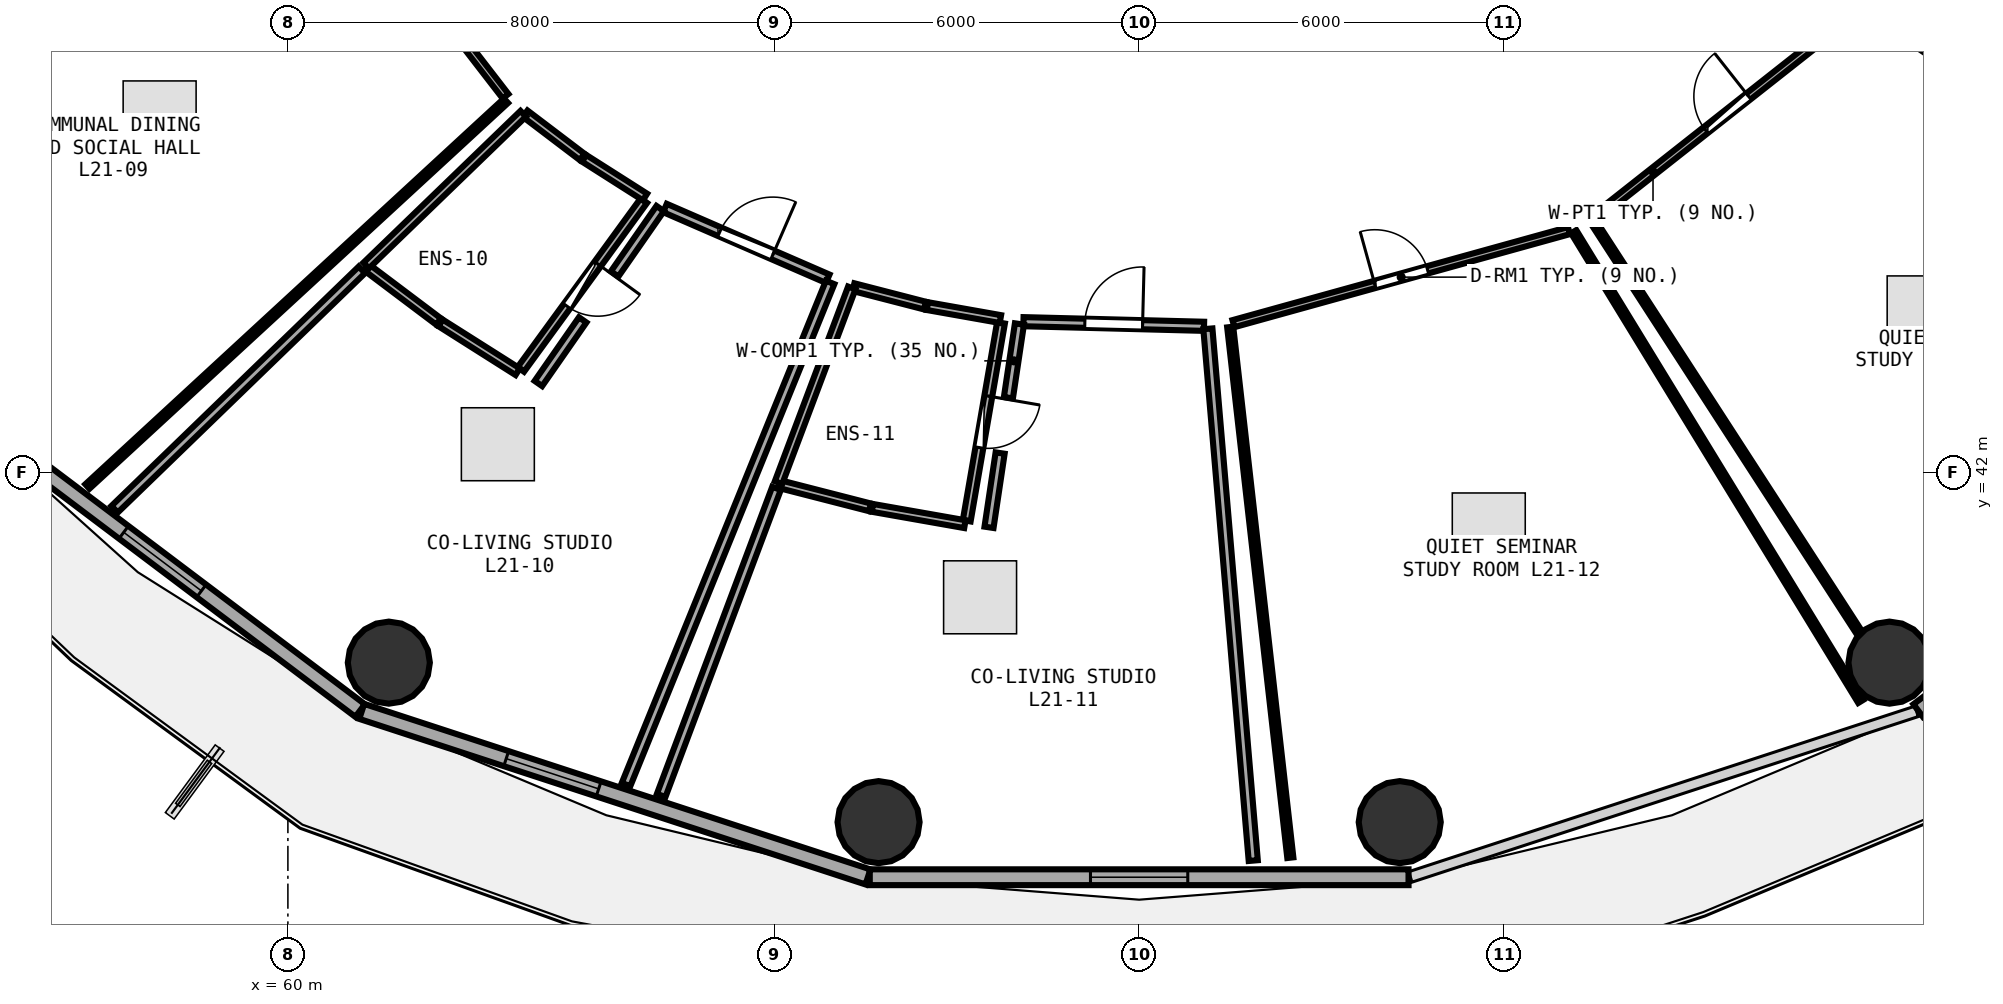
"""IFC4 building model, lengths in metres.
Left out: names, types, materials, properties, quantities, classifications, styles, units other than length and angle.
Written with IfcOpenShell. Run it as: python <this file> out.ifc"""

import sys

from ifc_helpers import new_model, si_unit, direction, frame, frame_2d, origin, origin_2d, place, context, subcontext, project, spatial, rectangle, circle, extrude, element, fill, save


model = new_model("IFC4")
c1 = context("Model", 3, precision=1e-05, world=origin(), true_north=direction((0.0, 1.0)))
c2 = subcontext(c1, "Body", "Model", "MODEL_VIEW")
j1 = project(units=[si_unit("LENGTHUNIT", "METRE"), si_unit("PLANEANGLEUNIT", "RADIAN")], contexts=[c1])
p1 = place(None, origin())
s1 = spatial("IfcSite", under=j1, at=p1, CompositionType="ELEMENT")
p2 = place(p1, origin())
s2 = spatial("IfcBuilding", under=s1, at=p2, CompositionType="ELEMENT")
p3 = place(p2, frame((0.0, 0.0, 83.85)))
s3 = spatial("IfcBuildingStorey", under=s2, at=p3, CompositionType="ELEMENT", Elevation=83.85)
for number, where, z_axis, x_axis in (
    (1, (61.66, 38.878, 0.0), (0.0, 0.0, 1.0), (1.0, 0.0, 0.0)),
    (2, (69.714, 36.255, 0.0), (0.0, 0.0, 1.0), (1.0, 0.0, 0.0)),
    (3, (78.286, 36.255, 0.0), (0.0, 0.0, 1.0), (1.0, 0.0, 0.0)),
    (4, (86.34, 38.878, 0.0), (0.0, 0.0, 1.0), (1.0, 0.0, 0.0)),
):
    element("IfcColumn", number, at=place(p3, frame(where, z_axis=z_axis, x_axis=x_axis)), inside=s3, PredefinedType="COLUMN", context=c2, shape_type="SweptSolid", body=[
        extrude(circle(Radius=0.675, at=origin_2d()), origin(), (0.0, 0.0, 1.0), 3.75),
    ])
p4 = place(p3, frame((54.401, 43.207, 0.0), z_axis=(0.0, 0.0, 1.0), x_axis=(0.798501507879, -0.601992808857, 0.0)))
e5 = element("IfcWall", 5, at=p4, inside=s3, PredefinedType="SOLIDWALL", context=c2, shape_type="SweptSolid", body=[
    extrude(rectangle(XDim=8.499, YDim=0.26, at=frame_2d((4.25, 0.0))), origin(), (0.0, 0.0, 1.0), 3.475),
])
p5 = place(p4, frame((3.63, 0.0, 0.85)))
e6 = element("IfcOpeningElement", 6, at=p5, cuts=e5, PredefinedType="OPENING", context=c2, shape_type="SweptSolid", body=[
    extrude(rectangle(XDim=1.6, YDim=1.45, at=frame_2d((0.8, 0.725))), frame((0.0, 0.14, 0.0), z_axis=(0.0, -1.0, 0.0), x_axis=(1.0, 0.0, 0.0)), (0.0, 0.0, 1.0), 0.28),
])
p6 = place(p3, frame((61.214, 38.077, 0.0), z_axis=(0.0, 0.0, 1.0), x_axis=(0.950471101963, -0.310812941064, 0.0)))
e7 = element("IfcWall", 7, at=p6, inside=s3, PredefinedType="SOLIDWALL", context=c2, shape_type="SweptSolid", body=[
    extrude(rectangle(XDim=8.76, YDim=0.26, at=frame_2d((4.38, 0.0))), origin(), (0.0, 0.0, 1.0), 3.475),
])
p7 = place(p6, frame((2.5, 0.0, 0.85)))
e8 = element("IfcOpeningElement", 8, at=p7, cuts=e7, PredefinedType="OPENING", context=c2, shape_type="SweptSolid", body=[
    extrude(rectangle(XDim=1.6, YDim=1.45, at=frame_2d((0.8, 0.725))), frame((0.0, 0.14, 0.0), z_axis=(0.0, -1.0, 0.0), x_axis=(1.0, 0.0, 0.0)), (0.0, 0.0, 1.0), 0.28),
])
p8 = place(p3, frame((69.57, 35.349, 0.0), z_axis=(0.0, 0.0, 1.0), x_axis=(1.0, 0.0, 0.0)))
e9 = element("IfcWall", 9, at=p8, inside=s3, PredefinedType="SOLIDWALL", context=c2, shape_type="SweptSolid", body=[
    extrude(rectangle(XDim=8.861, YDim=0.26, at=frame_2d((4.43, 0.0))), origin(), (0.0, 0.0, 1.0), 3.475),
])
p9 = place(p8, frame((3.63, 0.0, 0.85)))
e10 = element("IfcOpeningElement", 10, at=p9, cuts=e9, PredefinedType="OPENING", context=c2, shape_type="SweptSolid", body=[
    extrude(rectangle(XDim=1.6, YDim=1.45, at=frame_2d((0.8, 0.725))), frame((0.0, 0.14, 0.0), z_axis=(0.0, -1.0, 0.0), x_axis=(1.0, 0.0, 0.0)), (0.0, 0.0, 1.0), 0.28),
])
p10 = place(p3, frame((86.812, 38.09, 0.0), z_axis=(0.0, 0.0, 1.0), x_axis=(0.798501507879, 0.601992808857, 0.0)))
e11 = element("IfcWall", 11, at=p10, inside=s3, PredefinedType="SOLIDWALL", context=c2, shape_type="SweptSolid", body=[
    extrude(rectangle(XDim=8.499, YDim=0.26, at=frame_2d((4.25, 0.0))), origin(), (0.0, 0.0, 1.0), 3.475),
])
p11 = place(p10, frame((3.45, 0.0, 0.85)))
e12 = element("IfcOpeningElement", 12, at=p11, cuts=e11, PredefinedType="OPENING", context=c2, shape_type="SweptSolid", body=[
    extrude(rectangle(XDim=1.6, YDim=1.45, at=frame_2d((0.8, 0.725))), frame((0.0, 0.14, 0.0), z_axis=(0.0, -1.0, 0.0), x_axis=(1.0, 0.0, 0.0)), (0.0, 0.0, 1.0), 0.28),
])
p12 = place(p3, frame((60.275, 52.473, 0.0), z_axis=(0.0, 0.0, 1.0), x_axis=(0.611167326409, -0.791501420801, 0.0)))
e13 = element("IfcWall", 13, at=p12, inside=s3, PredefinedType="PARTITIONING", context=c2, shape_type="SweptSolid", body=[
    extrude(rectangle(XDim=5.407, YDim=0.12, at=frame_2d((2.704, 0.0))), origin(), (0.0, 0.0, 1.0), 2.925),
])
p13 = place(p12, frame((2.254, 0.0, 0.0)))
e14 = element("IfcOpeningElement", 14, at=p13, cuts=e13, PredefinedType="OPENING", context=c2, shape_type="SweptSolid", body=[
    extrude(rectangle(XDim=0.9, YDim=2.08, at=frame_2d((0.45, 1.04))), frame((0.0, 0.07, 0.0), z_axis=(0.0, -1.0, 0.0), x_axis=(1.0, 0.0, 0.0)), (0.0, 0.0, 1.0), 0.14),
])
p14 = place(p3, frame((65.855, 46.477, 0.0), z_axis=(0.0, 0.0, 1.0), x_axis=(-0.589016516568, -0.808120995402, 0.0)))
e15 = element("IfcWall", 15, at=p14, inside=s3, PredefinedType="PLUMBINGWALL", context=c2, shape_type="SweptSolid", body=[
    extrude(rectangle(XDim=3.435, YDim=0.13, at=frame_2d((1.718, 0.0))), origin(), (0.0, 0.0, 1.0), 3.175),
])
p15 = place(p14, frame((1.288, 0.0, 0.0)))
e16 = element("IfcOpeningElement", 16, at=p15, cuts=e15, PredefinedType="OPENING", context=c2, shape_type="SweptSolid", body=[
    extrude(rectangle(XDim=0.86, YDim=2.05, at=frame_2d((0.43, 1.025))), frame((0.0, 0.075, 0.0), z_axis=(0.0, -1.0, 0.0), x_axis=(1.0, 0.0, 0.0)), (0.0, 0.0, 1.0), 0.15),
])
p16 = place(p3, frame((66.201, 46.355, 0.0), z_axis=(0.0, 0.0, 1.0), x_axis=(0.917173751057, -0.398487528503, 0.0)))
e17 = element("IfcWall", 17, at=p16, inside=s3, PredefinedType="PARTITIONING", context=c2, shape_type="SweptSolid", body=[
    extrude(rectangle(XDim=2.919, YDim=0.15, at=frame_2d((1.459, 0.0))), origin(), (0.0, 0.0, 1.0), 2.925),
])
p17 = place(p16, frame((0.984, 0.0, 0.0)))
e18 = element("IfcOpeningElement", 18, at=p17, cuts=e17, PredefinedType="OPENING", context=c2, shape_type="SweptSolid", body=[
    extrude(rectangle(XDim=0.95, YDim=2.08, at=frame_2d((0.475, 1.04))), frame((0.0, 0.085, 0.0), z_axis=(0.0, -1.0, 0.0), x_axis=(1.0, 0.0, 0.0)), (0.0, 0.0, 1.0), 0.17),
])
p18 = place(p3, frame((71.728, 44.466, 0.0), z_axis=(0.0, 0.0, 1.0), x_axis=(-0.170592496202, -0.985341666753, 0.0)))
e19 = element("IfcWall", 19, at=p18, inside=s3, PredefinedType="PLUMBINGWALL", context=c2, shape_type="SweptSolid", body=[
    extrude(rectangle(XDim=3.303, YDim=0.13, at=frame_2d((1.651, 0.0))), origin(), (0.0, 0.0, 1.0), 3.175),
])
p19 = place(p18, frame((1.222, 0.0, 0.0)))
e20 = element("IfcOpeningElement", 20, at=p19, cuts=e19, PredefinedType="OPENING", context=c2, shape_type="SweptSolid", body=[
    extrude(rectangle(XDim=0.86, YDim=2.05, at=frame_2d((0.43, 1.025))), frame((0.0, 0.075, 0.0), z_axis=(0.0, -1.0, 0.0), x_axis=(1.0, 0.0, 0.0)), (0.0, 0.0, 1.0), 0.15),
])
p20 = place(p3, frame((72.097, 44.486, 0.0), z_axis=(0.0, 0.0, 1.0), x_axis=(0.999671268913, -0.025638917871, 0.0)))
e21 = element("IfcWall", 21, at=p20, inside=s3, PredefinedType="PARTITIONING", context=c2, shape_type="SweptSolid", body=[
    extrude(rectangle(XDim=2.971, YDim=0.15, at=frame_2d((1.485, 0.0))), origin(), (0.0, 0.0, 1.0), 3.48),
])
p21 = place(p20, frame((1.01, 0.0, 0.0)))
e22 = element("IfcOpeningElement", 22, at=p21, cuts=e21, PredefinedType="OPENING", context=c2, shape_type="SweptSolid", body=[
    extrude(rectangle(XDim=0.95, YDim=2.08, at=frame_2d((0.475, 1.04))), frame((0.0, 0.085, 0.0), z_axis=(0.0, -1.0, 0.0), x_axis=(1.0, 0.0, 0.0)), (0.0, 0.0, 1.0), 0.17),
])
p22 = place(p3, frame((75.551, 44.453, 0.0), z_axis=(0.0, 0.0, 1.0), x_axis=(0.963633279283, 0.267228185374, 0.0)))
e23 = element("IfcWall", 23, at=p22, inside=s3, PredefinedType="PARTITIONING", context=c2, shape_type="SweptSolid", body=[
    extrude(rectangle(XDim=5.726, YDim=0.12, at=frame_2d((2.863, 0.0))), origin(), (0.0, 0.0, 1.0), 2.925),
])
p23 = place(p22, frame((2.413, 0.0, 0.0)))
e24 = element("IfcOpeningElement", 24, at=p23, cuts=e23, PredefinedType="OPENING", context=c2, shape_type="SweptSolid", body=[
    extrude(rectangle(XDim=0.9, YDim=2.08, at=frame_2d((0.45, 1.04))), frame((0.0, 0.07, 0.0), z_axis=(0.0, -1.0, 0.0), x_axis=(1.0, 0.0, 0.0)), (0.0, 0.0, 1.0), 0.14),
])
p24 = place(p3, frame((81.494, 46.198, 0.0), z_axis=(0.0, 0.0, 1.0), x_axis=(0.785315722545, 0.619095482074, 0.0)))
e25 = element("IfcWall", 25, at=p24, inside=s3, PredefinedType="PARTITIONING", context=c2, shape_type="SweptSolid", body=[
    extrude(rectangle(XDim=5.54, YDim=0.12, at=frame_2d((2.77, 0.0))), origin(), (0.0, 0.0, 1.0), 2.925),
])
p25 = place(p24, frame((2.32, 0.0, 0.0)))
e26 = element("IfcOpeningElement", 26, at=p25, cuts=e25, PredefinedType="OPENING", context=c2, shape_type="SweptSolid", body=[
    extrude(rectangle(XDim=0.9, YDim=2.08, at=frame_2d((0.45, 1.04))), frame((0.0, 0.07, 0.0), z_axis=(0.0, -1.0, 0.0), x_axis=(1.0, 0.0, 0.0)), (0.0, 0.0, 1.0), 0.14),
])
p26 = place(p3, frame((63.587, 48.119, 0.0), z_axis=(0.0, 0.0, 1.0), x_axis=(-0.735387084409, -0.677647279995, 0.0)))
e27 = element("IfcWall", 27, at=p26, inside=s3, PredefinedType="PARTITIONING", context=c2, shape_type="SweptSolid", body=[
    extrude(rectangle(XDim=9.361, YDim=0.1, at=frame_2d((4.681, 0.0))), origin(), (0.0, 0.0, 1.0), 2.975),
])
p27 = place(p3, frame((63.901, 47.907, 0.0), z_axis=(0.0, 0.0, 1.0), x_axis=(0.796629313308, -0.604468144056, 0.0)))
e28 = element("IfcWall", 28, at=p27, inside=s3, PredefinedType="PLUMBINGWALL", context=c2, shape_type="SweptSolid", body=[
    extrude(rectangle(XDim=1.178, YDim=0.13, at=frame_2d((0.589, 0.0))), origin(), (0.0, 0.0, 1.0), 2.925),
])
p28 = place(p3, frame((64.872, 47.172, 0.0), z_axis=(0.0, 0.0, 1.0), x_axis=(0.843822426876, -0.536622504095, 0.0)))
e29 = element("IfcWall", 29, at=p28, inside=s3, PredefinedType="PLUMBINGWALL", context=c2, shape_type="SweptSolid", body=[
    extrude(rectangle(XDim=1.187, YDim=0.13, at=frame_2d((0.593, 0.0))), origin(), (0.0, 0.0, 1.0), 3.48),
])
p29 = place(p3, frame((63.779, 43.663, 0.0), z_axis=(0.0, 0.0, 1.0), x_axis=(-0.844931806669, 0.53487404319, 0.0)))
e30 = element("IfcWall", 30, at=p29, inside=s3, PredefinedType="PLUMBINGWALL", context=c2, shape_type="SweptSolid", body=[
    extrude(rectangle(XDim=1.501, YDim=0.13, at=frame_2d((0.75, 0.0))), origin(), (0.0, 0.0, 1.0), 2.925),
])
p30 = place(p3, frame((62.478, 44.488, 0.0), z_axis=(0.0, 0.0, 1.0), x_axis=(-0.798935684124, 0.601416471868, 0.0)))
e31 = element("IfcWall", 31, at=p30, inside=s3, PredefinedType="PLUMBINGWALL", context=c2, shape_type="SweptSolid", body=[
    extrude(rectangle(XDim=1.488, YDim=0.13, at=frame_2d((0.744, 0.0))), origin(), (0.0, 0.0, 1.0), 3.175),
])
p31 = place(p3, frame((61.287, 45.409, 0.0), z_axis=(0.0, 0.0, 1.0), x_axis=(0.719134400332, 0.694871005481, 0.0)))
e32 = element("IfcWall", 32, at=p31, inside=s3, PredefinedType="PLUMBINGWALL", context=c2, shape_type="SweptSolid", body=[
    extrude(rectangle(XDim=3.592, YDim=0.13, at=frame_2d((1.796, 0.0))), origin(), (0.0, 0.0, 1.0), 3.175),
])
p32 = place(p3, frame((68.918, 45.131, 0.0), z_axis=(0.0, 0.0, 1.0), x_axis=(-0.376588613193, -0.926380600193, 0.0)))
e33 = element("IfcWall", 33, at=p32, inside=s3, PredefinedType="PARTITIONING", context=c2, shape_type="SweptSolid", body=[
    extrude(rectangle(XDim=8.914, YDim=0.15, at=frame_2d((4.457, 0.0))), origin(), (0.0, 0.0, 1.0), 2.925),
])
p33 = place(p3, frame((57.15, 41.401, 0.0), z_axis=(0.0, 0.0, 1.0), x_axis=(0.718527749954, 0.695498290829, 0.0)))
e34 = element("IfcWall", 34, at=p33, inside=s3, PredefinedType="PARTITIONING", context=c2, shape_type="SweptSolid", body=[
    extrude(rectangle(XDim=5.661, YDim=0.15, at=frame_2d((2.831, 0.0))), origin(), (0.0, 0.0, 1.0), 2.975),
])
p34 = place(p3, frame((64.12, 43.469, 0.0), z_axis=(0.0, 0.0, 1.0), x_axis=(0.571339432424, 0.820713867897, 0.0)))
e35 = element("IfcWall", 35, at=p34, inside=s3, PredefinedType="PARTITIONING", context=c2, shape_type="SweptSolid", body=[
    extrude(rectangle(XDim=1.275, YDim=0.15, at=frame_2d((0.637, 0.0))), origin(), (0.0, 0.0, 1.0), 3.175),
])
p35 = place(p3, frame((65.374, 45.27, 0.0), z_axis=(0.0, 0.0, 1.0), x_axis=(0.57134818524, 0.82070777456, 0.0)))
e36 = element("IfcWall", 36, at=p35, inside=s3, PredefinedType="PARTITIONING", context=c2, shape_type="SweptSolid", body=[
    extrude(rectangle(XDim=1.311, YDim=0.15, at=frame_2d((0.656, 0.0))), origin(), (0.0, 0.0, 1.0), 3.235),
])
p36 = place(p3, frame((69.3, 45.054, 0.0), z_axis=(0.0, 0.0, 1.0), x_axis=(0.968247539973, -0.249993402585, 0.0)))
e37 = element("IfcWall", 37, at=p36, inside=s3, PredefinedType="PLUMBINGWALL", context=c2, shape_type="SweptSolid", body=[
    extrude(rectangle(XDim=1.216, YDim=0.13, at=frame_2d((0.608, 0.0))), origin(), (0.0, 0.0, 1.0), 3.48),
])
p37 = place(p3, frame((70.517, 44.741, 0.0), z_axis=(0.0, 0.0, 1.0), x_axis=(0.98466652622, -0.174447218786, 0.0)))
e38 = element("IfcWall", 38, at=p37, inside=s3, PredefinedType="PLUMBINGWALL", context=c2, shape_type="SweptSolid", body=[
    extrude(rectangle(XDim=1.22, YDim=0.13, at=frame_2d((0.61, 0.0))), origin(), (0.0, 0.0, 1.0), 3.48),
])
p38 = place(p3, frame((71.134, 41.156, 0.0), z_axis=(0.0, 0.0, 1.0), x_axis=(-0.984831248295, 0.173514876545, 0.0)))
e39 = element("IfcWall", 39, at=p38, inside=s3, PredefinedType="PLUMBINGWALL", context=c2, shape_type="SweptSolid", body=[
    extrude(rectangle(XDim=1.545, YDim=0.13, at=frame_2d((0.772, 0.0))), origin(), (0.0, 0.0, 1.0), 3.48),
])
p39 = place(p3, frame((69.573, 41.432, 0.0), z_axis=(0.0, 0.0, 1.0), x_axis=(-0.968594416315, 0.248646046989, 0.0)))
e40 = element("IfcWall", 40, at=p39, inside=s3, PredefinedType="PLUMBINGWALL", context=c2, shape_type="SweptSolid", body=[
    extrude(rectangle(XDim=1.541, YDim=0.13, at=frame_2d((0.77, 0.0))), origin(), (0.0, 0.0, 1.0), 2.925),
])
p40 = place(p3, frame((68.069, 41.839, 0.0), z_axis=(0.0, 0.0, 1.0), x_axis=(0.352202531552, 0.935923809275, 0.0)))
e41 = element("IfcWall", 41, at=p40, inside=s3, PredefinedType="PLUMBINGWALL", context=c2, shape_type="SweptSolid", body=[
    extrude(rectangle(XDim=3.421, YDim=0.13, at=frame_2d((1.71, 0.0))), origin(), (0.0, 0.0, 1.0), 2.925),
])
p41 = place(p3, frame((75.13, 44.368, 0.0), z_axis=(0.0, 0.0, 1.0), x_axis=(0.085031915446, -0.996378228062, 0.0)))
e42 = element("IfcWall", 42, at=p41, inside=s3, PredefinedType="PARTITIONING", context=c2, shape_type="SweptSolid", body=[
    extrude(rectangle(XDim=8.777, YDim=0.15, at=frame_2d((4.389, 0.0))), origin(), (0.0, 0.0, 1.0), 2.975),
])
p42 = place(p3, frame((66.139, 36.694, 0.0), z_axis=(0.0, 0.0, 1.0), x_axis=(0.351589591196, 0.936154239088, 0.0)))
e43 = element("IfcWall", 43, at=p42, inside=s3, PredefinedType="PARTITIONING", context=c2, shape_type="SweptSolid", body=[
    extrude(rectangle(XDim=5.395, YDim=0.15, at=frame_2d((2.697, 0.0))), origin(), (0.0, 0.0, 1.0), 2.975),
])
p43 = place(p3, frame((71.531, 41.104, 0.0), z_axis=(0.0, 0.0, 1.0), x_axis=(0.147866770411, 0.989007289259, 0.0)))
e44 = element("IfcWall", 44, at=p43, inside=s3, PredefinedType="PARTITIONING", context=c2, shape_type="SweptSolid", body=[
    extrude(rectangle(XDim=1.235, YDim=0.15, at=frame_2d((0.618, 0.0))), origin(), (0.0, 0.0, 1.0), 3.175),
])
p44 = place(p3, frame((71.85, 43.235, 0.0), z_axis=(0.0, 0.0, 1.0), x_axis=(0.14797037904, 0.988991793154, 0.0)))
e45 = element("IfcWall", 45, at=p44, inside=s3, PredefinedType="PARTITIONING", context=c2, shape_type="SweptSolid", body=[
    extrude(rectangle(XDim=1.226, YDim=0.15, at=frame_2d((0.613, 0.0))), origin(), (0.0, 0.0, 1.0), 3.48),
])
p45 = place(p3, frame((81.147, 45.965, 0.0), z_axis=(0.0, 0.0, 1.0), x_axis=(0.521624536189, -0.853175153908, 0.0)))
e46 = element("IfcWall", 46, at=p45, inside=s3, PredefinedType="PARTITIONING", context=c2, shape_type="SweptSolid", body=[
    extrude(rectangle(XDim=9.053, YDim=0.1, at=frame_2d((4.526, 0.0))), origin(), (0.0, 0.0, 1.0), 2.975),
])
p46 = place(p3, frame((76.487, 35.671, 0.0), z_axis=(0.0, 0.0, 1.0), x_axis=(-0.112612784854, 0.993638948858, 0.0)))
e47 = element("IfcWall", 47, at=p46, inside=s3, PredefinedType="PARTITIONING", context=c2, shape_type="SweptSolid", body=[
    extrude(rectangle(XDim=8.782, YDim=0.1, at=frame_2d((4.391, 0.0))), origin(), (0.0, 0.0, 1.0), 2.975),
])
p47 = place(p3, frame((85.925, 49.643, 0.0), z_axis=(0.0, 0.0, 1.0), x_axis=(0.826688408753, -0.562659999319, 0.0)))
e48 = element("IfcWall", 48, at=p47, inside=s3, PredefinedType="PARTITIONING", context=c2, shape_type="SweptSolid", body=[
    extrude(rectangle(XDim=9.539, YDim=0.1, at=frame_2d((4.77, 0.0))), origin(), (0.0, 0.0, 1.0), 2.975),
])
p48 = place(p3, frame((85.844, 39.372, 0.0), z_axis=(0.0, 0.0, 1.0), x_axis=(-0.543590830013, 0.839350349691, 0.0)))
e49 = element("IfcWall", 49, at=p48, inside=s3, PredefinedType="PARTITIONING", context=c2, shape_type="SweptSolid", body=[
    extrude(rectangle(XDim=8.048, YDim=0.1, at=frame_2d((4.024, 0.0))), origin(), (0.0, 0.0, 1.0), 3.175),
])
p49 = place(p3, frame((87.552, 48.874, 0.0), z_axis=(0.0, 0.0, 1.0), x_axis=(-0.805902241708, 0.592048627065, 0.0)))
e50 = element("IfcWall", 50, at=p49, inside=s3, PredefinedType="PARTITIONING", context=c2, shape_type="SweptSolid", body=[
    extrude(rectangle(XDim=1.746, YDim=0.1, at=frame_2d((0.873, 0.0))), origin(), (0.0, 0.0, 1.0), 3.235),
])
p50 = place(p5, origin())
e51 = element("IfcWindow", 51, at=p50, inside=s3, PartitioningType="SINGLE_PANEL", PredefinedType="WINDOW", context=c2, shape_type="SweptSolid", body=[
    extrude(rectangle(XDim=1.6, YDim=1.45, at=frame_2d((0.8, 0.725))), frame((0.0, 0.03, 0.0), z_axis=(0.0, -1.0, 0.0), x_axis=(1.0, 0.0, 0.0)), (0.0, 0.0, 1.0), 0.06),
])
fill(e6, e51)
p51 = place(p7, origin())
e52 = element("IfcWindow", 52, at=p51, inside=s3, PartitioningType="SINGLE_PANEL", PredefinedType="WINDOW", context=c2, shape_type="SweptSolid", body=[
    extrude(rectangle(XDim=1.6, YDim=1.45, at=frame_2d((0.8, 0.725))), frame((0.0, 0.03, 0.0), z_axis=(0.0, -1.0, 0.0), x_axis=(1.0, 0.0, 0.0)), (0.0, 0.0, 1.0), 0.06),
])
fill(e8, e52)
p52 = place(p9, origin())
e53 = element("IfcWindow", 53, at=p52, inside=s3, PartitioningType="SINGLE_PANEL", PredefinedType="WINDOW", context=c2, shape_type="SweptSolid", body=[
    extrude(rectangle(XDim=1.6, YDim=1.45, at=frame_2d((0.8, 0.725))), frame((0.0, 0.03, 0.0), z_axis=(0.0, -1.0, 0.0), x_axis=(1.0, 0.0, 0.0)), (0.0, 0.0, 1.0), 0.06),
])
fill(e10, e53)
p53 = place(p15, origin())
e54 = element("IfcDoor", 54, at=p53, inside=s3, OperationType="SINGLE_SWING_LEFT", PredefinedType="DOOR", context=c2, shape_type="SweptSolid", body=[
    extrude(rectangle(XDim=0.86, YDim=2.05, at=frame_2d((0.43, 1.025))), frame((0.0, 0.025, 0.0), z_axis=(0.0, -1.0, 0.0), x_axis=(1.0, 0.0, 0.0)), (0.0, 0.0, 1.0), 0.05),
])
fill(e16, e54)
p54 = place(p17, origin())
e55 = element("IfcDoor", 55, at=p54, inside=s3, OperationType="SINGLE_SWING_RIGHT", PredefinedType="DOOR", context=c2, shape_type="SweptSolid", body=[
    extrude(rectangle(XDim=0.95, YDim=2.08, at=frame_2d((0.475, 1.04))), frame((0.0, 0.025, 0.0), z_axis=(0.0, -1.0, 0.0), x_axis=(1.0, 0.0, 0.0)), (0.0, 0.0, 1.0), 0.05),
])
fill(e18, e55)
p55 = place(p19, origin())
e56 = element("IfcDoor", 56, at=p55, inside=s3, OperationType="SINGLE_SWING_LEFT", PredefinedType="DOOR", context=c2, shape_type="SweptSolid", body=[
    extrude(rectangle(XDim=0.86, YDim=2.05, at=frame_2d((0.43, 1.025))), frame((0.0, 0.025, 0.0), z_axis=(0.0, -1.0, 0.0), x_axis=(1.0, 0.0, 0.0)), (0.0, 0.0, 1.0), 0.05),
])
fill(e20, e56)
p56 = place(p21, origin())
e57 = element("IfcDoor", 57, at=p56, inside=s3, OperationType="SINGLE_SWING_RIGHT", PredefinedType="DOOR", context=c2, shape_type="SweptSolid", body=[
    extrude(rectangle(XDim=0.95, YDim=2.08, at=frame_2d((0.475, 1.04))), frame((0.0, 0.025, 0.0), z_axis=(0.0, -1.0, 0.0), x_axis=(1.0, 0.0, 0.0)), (0.0, 0.0, 1.0), 0.05),
])
fill(e22, e57)
p57 = place(p23, origin())
e58 = element("IfcDoor", 58, at=p57, inside=s3, OperationType="SINGLE_SWING_LEFT", PredefinedType="DOOR", context=c2, shape_type="SweptSolid", body=[
    extrude(rectangle(XDim=0.9, YDim=2.08, at=frame_2d((0.45, 1.04))), frame((0.0, 0.025, 0.0), z_axis=(0.0, -1.0, 0.0), x_axis=(1.0, 0.0, 0.0)), (0.0, 0.0, 1.0), 0.05),
])
fill(e24, e58)
p58 = place(p25, origin())
e59 = element("IfcDoor", 59, at=p58, inside=s3, OperationType="SINGLE_SWING_RIGHT", PredefinedType="DOOR", context=c2, shape_type="SweptSolid", body=[
    extrude(rectangle(XDim=0.9, YDim=2.08, at=frame_2d((0.45, 1.04))), frame((0.0, 0.025, 0.0), z_axis=(0.0, -1.0, 0.0), x_axis=(1.0, 0.0, 0.0)), (0.0, 0.0, 1.0), 0.05),
])
fill(e26, e59)
save(model, sys.argv[1])
